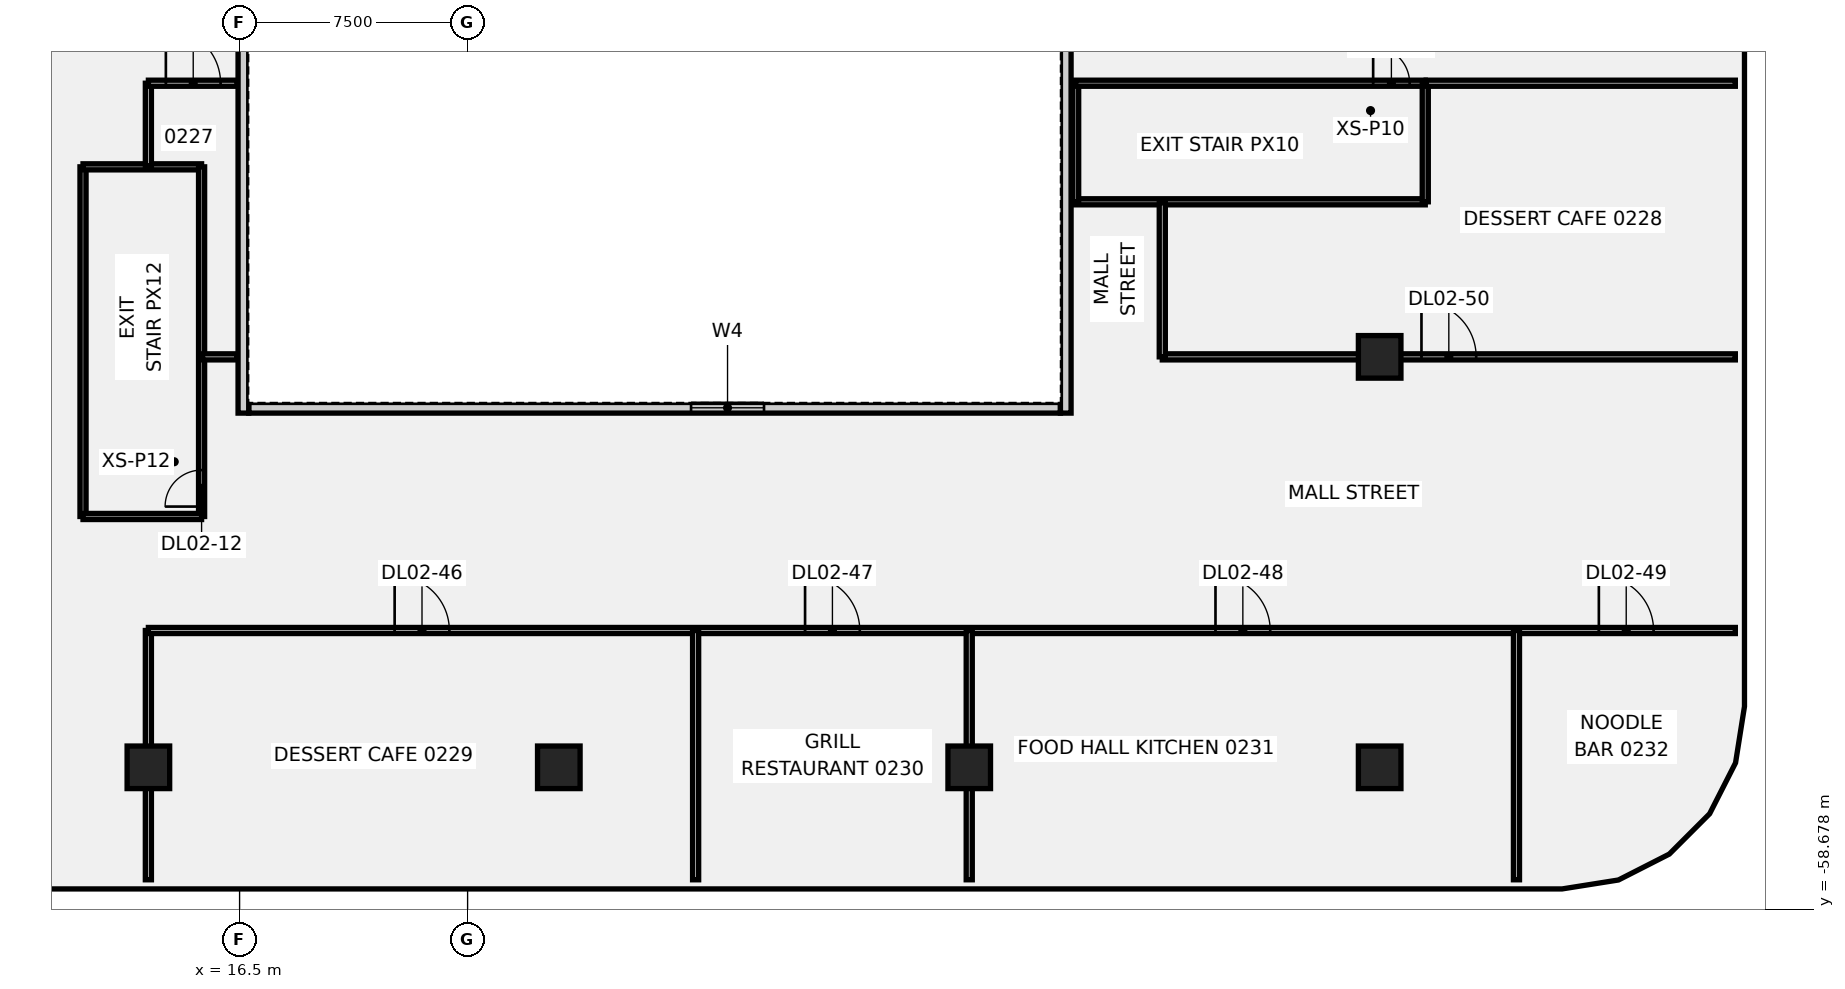
"""IFC4 building model, lengths in metres.
Left out: names, types, materials, properties, quantities, classifications, styles, units other than length and angle.
Written with IfcOpenShell. Run it as: python <this file> out.ifc"""

import sys

from ifc_helpers import new_model, si_unit, direction, frame, frame_2d, origin, origin_2d, place, context, subcontext, project, spatial, rectangle, extrude, element, fill, save


model = new_model("IFC4")
c1 = context("Model", 3, precision=1e-05, world=origin(), true_north=direction((0.0, 1.0)))
c2 = subcontext(c1, "Body", "Model", "MODEL_VIEW")
j1 = project(units=[si_unit("LENGTHUNIT", "METRE"), si_unit("PLANEANGLEUNIT", "RADIAN")], contexts=[c1])
p1 = place(None, origin())
s1 = spatial("IfcSite", under=j1, at=p1, CompositionType="ELEMENT")
p2 = place(p1, origin())
s2 = spatial("IfcBuilding", under=s1, at=p2, CompositionType="ELEMENT")
p3 = place(p2, frame((0.0, 0.0, 15.0)))
s3 = spatial("IfcBuildingStorey", under=s2, at=p3, CompositionType="ELEMENT", Elevation=15.0)
for number, where, z_axis, x_axis in (
    (1, (13.5, -54.0, -0.5), (0.0, 0.0, 1.0), (1.0, 0.0, 0.0)),
    (2, (27.0, -54.0, -0.5), (0.0, 0.0, 1.0), (1.0, 0.0, 0.0)),
    (3, (40.5, -54.0, -0.5), (0.0, 0.0, 1.0), (1.0, 0.0, 0.0)),
    (4, (54.0, -54.0, -0.5), (0.0, 0.0, 1.0), (1.0, 0.0, 0.0)),
    (5, (54.0, -40.5, -0.5), (0.0, 0.0, 1.0), (1.0, 0.0, 0.0)),
):
    element("IfcColumn", number, at=place(p3, frame(where, z_axis=z_axis, x_axis=x_axis)), inside=s3, PredefinedType="COLUMN", context=c2, shape_type="SweptSolid", body=[
        extrude(rectangle(XDim=1.4, YDim=1.4, at=origin_2d()), origin(), (0.0, 0.0, 1.0), 5.0),
    ])
p4 = place(p3, frame((11.35, -45.75, 0.0), z_axis=(0.0, 0.0, 1.0), x_axis=(0.0, 1.0, 0.0)))
e6 = element("IfcWall", 6, at=p4, inside=s3, PredefinedType="PARTITIONING", context=c2, shape_type="SweptSolid", body=[
    extrude(rectangle(XDim=11.5, YDim=0.2, at=frame_2d((5.75, 0.0))), origin(), (0.0, 0.0, 1.0), 4.5),
])
p5 = place(p3, frame((11.35, -34.25, 0.0), z_axis=(0.0, 0.0, 1.0), x_axis=(1.0, 0.0, 0.0)))
e7 = element("IfcWall", 7, at=p5, inside=s3, PredefinedType="PARTITIONING", context=c2, shape_type="SweptSolid", body=[
    extrude(rectangle(XDim=3.9, YDim=0.2, at=frame_2d((1.95, 0.0))), origin(), (0.0, 0.0, 1.0), 4.5),
])
p6 = place(p3, frame((15.25, -45.75, 0.0), z_axis=(0.0, 0.0, 1.0), x_axis=(0.0, 1.0, 0.0)))
e8 = element("IfcWall", 8, at=p6, inside=s3, PredefinedType="PARTITIONING", context=c2, shape_type="SweptSolid", body=[
    extrude(rectangle(XDim=11.5, YDim=0.2, at=frame_2d((5.75, 0.0))), origin(), (0.0, 0.0, 1.0), 4.5),
])
p7 = place(p6, frame((0.326, 0.0, 0.0)))
e9 = element("IfcOpeningElement", 9, at=p7, cuts=e8, PredefinedType="OPENING", context=c2, shape_type="SweptSolid", body=[
    extrude(rectangle(XDim=1.2, YDim=2.1, at=frame_2d((0.6, 1.05))), frame((0.0, 0.11, 0.0), z_axis=(0.0, -1.0, 0.0), x_axis=(1.0, 0.0, 0.0)), (0.0, 0.0, 1.0), 0.22),
])
p8 = place(p3, frame((11.35, -45.75, 0.0), z_axis=(0.0, 0.0, 1.0), x_axis=(1.0, 0.0, 0.0)))
e10 = element("IfcWall", 10, at=p8, inside=s3, PredefinedType="PARTITIONING", context=c2, shape_type="SweptSolid", body=[
    extrude(rectangle(XDim=3.9, YDim=0.2, at=frame_2d((1.95, 0.0))), origin(), (0.0, 0.0, 1.0), 4.5),
])
p9 = place(p3, frame((44.0, -35.4, 0.0), z_axis=(0.0, 0.0, 1.0), x_axis=(1.0, 0.0, 0.0)))
e11 = element("IfcWall", 11, at=p9, inside=s3, PredefinedType="PARTITIONING", context=c2, shape_type="SweptSolid", body=[
    extrude(rectangle(XDim=11.5, YDim=0.2, at=frame_2d((5.75, 0.0))), origin(), (0.0, 0.0, 1.0), 4.5),
])
p10 = place(p3, frame((44.0, -35.4, 0.0), z_axis=(0.0, 0.0, 1.0), x_axis=(0.0, 1.0, 0.0)))
e12 = element("IfcWall", 12, at=p10, inside=s3, PredefinedType="PARTITIONING", context=c2, shape_type="SweptSolid", body=[
    extrude(rectangle(XDim=3.9, YDim=0.2, at=frame_2d((1.95, 0.0))), origin(), (0.0, 0.0, 1.0), 4.5),
])
p11 = place(p3, frame((44.0, -31.5, 0.0), z_axis=(0.0, 0.0, 1.0), x_axis=(1.0, 0.0, 0.0)))
e13 = element("IfcWall", 13, at=p11, inside=s3, PredefinedType="PARTITIONING", context=c2, shape_type="SweptSolid", body=[
    extrude(rectangle(XDim=11.5, YDim=0.2, at=frame_2d((5.75, 0.0))), origin(), (0.0, 0.0, 1.0), 4.5),
])
p12 = place(p11, frame((9.786, 0.0, 0.0)))
e14 = element("IfcOpeningElement", 14, at=p12, cuts=e13, PredefinedType="OPENING", context=c2, shape_type="SweptSolid", body=[
    extrude(rectangle(XDim=1.2, YDim=2.1, at=frame_2d((0.6, 1.05))), frame((0.0, 0.11, 0.0), z_axis=(0.0, -1.0, 0.0), x_axis=(1.0, 0.0, 0.0)), (0.0, 0.0, 1.0), 0.22),
])
p13 = place(p3, frame((55.5, -35.4, 0.0), z_axis=(0.0, 0.0, 1.0), x_axis=(0.0, 1.0, 0.0)))
e15 = element("IfcWall", 15, at=p13, inside=s3, PredefinedType="PARTITIONING", context=c2, shape_type="SweptSolid", body=[
    extrude(rectangle(XDim=3.9, YDim=0.2, at=frame_2d((1.95, 0.0))), origin(), (0.0, 0.0, 1.0), 4.5),
])
p14 = place(p3, frame((13.5, -57.699, 0.0), z_axis=(0.0, 0.0, 1.0), x_axis=(0.0, 1.0, 0.0)))
e16 = element("IfcWall", 16, at=p14, inside=s3, PredefinedType="PARTITIONING", context=c2, shape_type="SweptSolid", body=[
    extrude(rectangle(XDim=8.199, YDim=0.2, at=frame_2d((4.1, 0.0))), origin(), (0.0, 0.0, 1.0), 4.5),
])
p15 = place(p3, frame((13.5, -49.5, 0.0), z_axis=(0.0, 0.0, 1.0), x_axis=(1.0, 0.0, 0.0)))
e17 = element("IfcWall", 17, at=p15, inside=s3, PredefinedType="PARTITIONING", context=c2, shape_type="SweptSolid", body=[
    extrude(rectangle(XDim=52.199, YDim=0.2, at=frame_2d((26.1, 0.0))), origin(), (0.0, 0.0, 1.0), 4.5),
])
p16 = place(p15, frame((8.1, 0.0, 0.0)))
e18 = element("IfcOpeningElement", 18, at=p16, cuts=e17, PredefinedType="OPENING", context=c2, shape_type="SweptSolid", body=[
    extrude(rectangle(XDim=1.8, YDim=2.1, at=frame_2d((0.9, 1.05))), frame((0.0, 0.11, 0.0), z_axis=(0.0, -1.0, 0.0), x_axis=(1.0, 0.0, 0.0)), (0.0, 0.0, 1.0), 0.22),
])
p17 = place(p15, frame((21.6, 0.0, 0.0)))
e19 = element("IfcOpeningElement", 19, at=p17, cuts=e17, PredefinedType="OPENING", context=c2, shape_type="SweptSolid", body=[
    extrude(rectangle(XDim=1.8, YDim=2.1, at=frame_2d((0.9, 1.05))), frame((0.0, 0.11, 0.0), z_axis=(0.0, -1.0, 0.0), x_axis=(1.0, 0.0, 0.0)), (0.0, 0.0, 1.0), 0.22),
])
p18 = place(p15, frame((35.1, 0.0, 0.0)))
e20 = element("IfcOpeningElement", 20, at=p18, cuts=e17, PredefinedType="OPENING", context=c2, shape_type="SweptSolid", body=[
    extrude(rectangle(XDim=1.8, YDim=2.1, at=frame_2d((0.9, 1.05))), frame((0.0, 0.11, 0.0), z_axis=(0.0, -1.0, 0.0), x_axis=(1.0, 0.0, 0.0)), (0.0, 0.0, 1.0), 0.22),
])
p19 = place(p15, frame((47.71, 0.0, 0.0)))
e21 = element("IfcOpeningElement", 21, at=p19, cuts=e17, PredefinedType="OPENING", context=c2, shape_type="SweptSolid", body=[
    extrude(rectangle(XDim=1.8, YDim=2.1, at=frame_2d((0.9, 1.05))), frame((0.0, 0.11, 0.0), z_axis=(0.0, -1.0, 0.0), x_axis=(1.0, 0.0, 0.0)), (0.0, 0.0, 1.0), 0.22),
])
p20 = place(p3, frame((13.5, -34.22, 0.0), z_axis=(0.0, 0.0, 1.0), x_axis=(0.0, 1.0, 0.0)))
e22 = element("IfcWall", 22, at=p20, inside=s3, PredefinedType="PARTITIONING", context=c2, shape_type="SweptSolid", body=[
    extrude(rectangle(XDim=2.72, YDim=0.2, at=frame_2d((1.36, 0.0))), origin(), (0.0, 0.0, 1.0), 4.5),
])
p21 = place(p3, frame((13.5, -31.5, 0.0), z_axis=(0.0, 0.0, 1.0), x_axis=(1.0, 0.0, 0.0)))
e23 = element("IfcWall", 23, at=p21, inside=s3, PredefinedType="PARTITIONING", context=c2, shape_type="SweptSolid", body=[
    extrude(rectangle(XDim=2.92, YDim=0.2, at=frame_2d((1.46, 0.0))), origin(), (0.0, 0.0, 1.0), 4.5),
])
p22 = place(p21, frame((0.575, 0.0, 0.0)))
e24 = element("IfcOpeningElement", 24, at=p22, cuts=e23, PredefinedType="OPENING", context=c2, shape_type="SweptSolid", body=[
    extrude(rectangle(XDim=1.8, YDim=2.1, at=frame_2d((0.9, 1.05))), frame((0.0, 0.11, 0.0), z_axis=(0.0, -1.0, 0.0), x_axis=(1.0, 0.0, 0.0)), (0.0, 0.0, 1.0), 0.22),
])
p23 = place(p3, frame((15.28, -40.5, 0.0), z_axis=(0.0, 0.0, 1.0), x_axis=(1.0, 0.0, 0.0)))
e25 = element("IfcWall", 25, at=p23, inside=s3, PredefinedType="PARTITIONING", context=c2, shape_type="SweptSolid", body=[
    extrude(rectangle(XDim=1.14, YDim=0.2, at=frame_2d((0.57, 0.0))), origin(), (0.0, 0.0, 1.0), 4.5),
])
for number, where, z_axis, x_axis in (
    (26, (31.5, -57.699, 0.0), (0.0, 0.0, 1.0), (0.0, 1.0, 0.0)),
    (27, (40.5, -57.699, 0.0), (0.0, 0.0, 1.0), (0.0, 1.0, 0.0)),
):
    element("IfcWall", number, at=place(p3, frame(where, z_axis=z_axis, x_axis=x_axis)), inside=s3, PredefinedType="PARTITIONING", context=c2, shape_type="SweptSolid", body=[
        extrude(rectangle(XDim=8.199, YDim=0.2, at=frame_2d((4.1, 0.0))), origin(), (0.0, 0.0, 1.0), 4.5),
    ])
p24 = place(p3, frame((46.85, -40.5, 0.0), z_axis=(0.0, 0.0, 1.0), x_axis=(1.0, 0.0, 0.0)))
e28 = element("IfcWall", 28, at=p24, inside=s3, PredefinedType="PARTITIONING", context=c2, shape_type="SweptSolid", body=[
    extrude(rectangle(XDim=18.849, YDim=0.2, at=frame_2d((9.424, 0.0))), origin(), (0.0, 0.0, 1.0), 4.5),
])
p25 = place(p24, frame((8.525, 0.0, 0.0)))
e29 = element("IfcOpeningElement", 29, at=p25, cuts=e28, PredefinedType="OPENING", context=c2, shape_type="SweptSolid", body=[
    extrude(rectangle(XDim=1.8, YDim=2.1, at=frame_2d((0.9, 1.05))), frame((0.0, 0.11, 0.0), z_axis=(0.0, -1.0, 0.0), x_axis=(1.0, 0.0, 0.0)), (0.0, 0.0, 1.0), 0.22),
])
p26 = place(p3, frame((46.85, -40.5, 0.0), z_axis=(0.0, 0.0, 1.0), x_axis=(0.0, 1.0, 0.0)))
e30 = element("IfcWall", 30, at=p26, inside=s3, PredefinedType="PARTITIONING", context=c2, shape_type="SweptSolid", body=[
    extrude(rectangle(XDim=5.07, YDim=0.2, at=frame_2d((2.535, 0.0))), origin(), (0.0, 0.0, 1.0), 4.5),
])
p27 = place(p3, frame((55.53, -31.5, 0.0), z_axis=(0.0, 0.0, 1.0), x_axis=(1.0, 0.0, 0.0)))
e31 = element("IfcWall", 31, at=p27, inside=s3, PredefinedType="PARTITIONING", context=c2, shape_type="SweptSolid", body=[
    extrude(rectangle(XDim=10.169, YDim=0.2, at=frame_2d((5.084, 0.0))), origin(), (0.0, 0.0, 1.0), 4.5),
])
p28 = place(p3, frame((58.5, -57.699, 0.0), z_axis=(0.0, 0.0, 1.0), x_axis=(0.0, 1.0, 0.0)))
e32 = element("IfcWall", 32, at=p28, inside=s3, PredefinedType="PARTITIONING", context=c2, shape_type="SweptSolid", body=[
    extrude(rectangle(XDim=8.199, YDim=0.2, at=frame_2d((4.1, 0.0))), origin(), (0.0, 0.0, 1.0), 4.5),
])
p29 = place(p3, frame((16.8, -42.175, 0.0), z_axis=(0.0, 0.0, 1.0), x_axis=(1.0, 0.0, 0.0)))
e33 = element("IfcWall", 33, at=p29, inside=s3, PredefinedType="SOLIDWALL", context=c2, shape_type="SweptSolid", body=[
    extrude(rectangle(XDim=26.7, YDim=0.35, at=frame_2d((13.35, 0.0))), origin(), (0.0, 0.0, 1.0), 4.5),
])
p30 = place(p29, frame((14.55, 0.0, 1.0)))
e34 = element("IfcOpeningElement", 34, at=p30, cuts=e33, PredefinedType="OPENING", context=c2, shape_type="SweptSolid", body=[
    extrude(rectangle(XDim=2.4, YDim=1.8, at=frame_2d((1.2, 0.9))), frame((0.0, 0.185, 0.0), z_axis=(0.0, -1.0, 0.0), x_axis=(1.0, 0.0, 0.0)), (0.0, 0.0, 1.0), 0.37),
])
p31 = place(p3, frame((16.625, -42.35, 0.0), z_axis=(0.0, 0.0, 1.0), x_axis=(0.0, 1.0, 0.0)))
e35 = element("IfcWall", 35, at=p31, inside=s3, PredefinedType="SOLIDWALL", context=c2, shape_type="SweptSolid", body=[
    extrude(rectangle(XDim=18.7, YDim=0.35, at=frame_2d((9.35, 0.0))), origin(), (0.0, 0.0, 1.0), 4.5),
])
p32 = place(p31, frame((14.9, 0.0, 1.0)))
e36 = element("IfcOpeningElement", 36, at=p32, cuts=e35, PredefinedType="OPENING", context=c2, shape_type="SweptSolid", body=[
    extrude(rectangle(XDim=2.4, YDim=1.8, at=frame_2d((1.2, 0.9))), frame((0.0, 0.185, 0.0), z_axis=(0.0, -1.0, 0.0), x_axis=(1.0, 0.0, 0.0)), (0.0, 0.0, 1.0), 0.37),
])
p33 = place(p3, frame((43.675, -42.35, 0.0), z_axis=(0.0, 0.0, 1.0), x_axis=(0.0, 1.0, 0.0)))
e37 = element("IfcWall", 37, at=p33, inside=s3, PredefinedType="SOLIDWALL", context=c2, shape_type="SweptSolid", body=[
    extrude(rectangle(XDim=18.7, YDim=0.35, at=frame_2d((9.35, 0.0))), origin(), (0.0, 0.0, 1.0), 4.5),
])
p34 = place(p33, frame((14.9, 0.0, 1.0)))
e38 = element("IfcOpeningElement", 38, at=p34, cuts=e37, PredefinedType="OPENING", context=c2, shape_type="SweptSolid", body=[
    extrude(rectangle(XDim=2.4, YDim=1.8, at=frame_2d((1.2, 0.9))), frame((0.0, 0.185, 0.0), z_axis=(0.0, -1.0, 0.0), x_axis=(1.0, 0.0, 0.0)), (0.0, 0.0, 1.0), 0.37),
])
p35 = place(p12, origin())
e39 = element("IfcDoor", 39, at=p35, inside=s3, OperationType="SINGLE_SWING_RIGHT", PredefinedType="DOOR", context=c2, shape_type="SweptSolid", body=[
    extrude(rectangle(XDim=1.2, YDim=2.1, at=frame_2d((0.6, 1.05))), frame((0.0, 0.025, 0.0), z_axis=(0.0, -1.0, 0.0), x_axis=(1.0, 0.0, 0.0)), (0.0, 0.0, 1.0), 0.05),
])
fill(e14, e39)
p36 = place(p7, origin())
e40 = element("IfcDoor", 40, at=p36, inside=s3, OperationType="SINGLE_SWING_RIGHT", PredefinedType="DOOR", context=c2, shape_type="SweptSolid", body=[
    extrude(rectangle(XDim=1.2, YDim=2.1, at=frame_2d((0.6, 1.05))), frame((0.0, 0.025, 0.0), z_axis=(0.0, -1.0, 0.0), x_axis=(1.0, 0.0, 0.0)), (0.0, 0.0, 1.0), 0.05),
])
fill(e9, e40)
p37 = place(p22, origin())
e41 = element("IfcDoor", 41, at=p37, inside=s3, OperationType="SINGLE_SWING_LEFT", PredefinedType="DOOR", context=c2, shape_type="SweptSolid", body=[
    extrude(rectangle(XDim=1.8, YDim=2.1, at=frame_2d((0.9, 1.05))), frame((0.0, 0.025, 0.0), z_axis=(0.0, -1.0, 0.0), x_axis=(1.0, 0.0, 0.0)), (0.0, 0.0, 1.0), 0.05),
])
fill(e24, e41)
p38 = place(p16, origin())
e42 = element("IfcDoor", 42, at=p38, inside=s3, OperationType="SINGLE_SWING_RIGHT", PredefinedType="DOOR", context=c2, shape_type="SweptSolid", body=[
    extrude(rectangle(XDim=1.8, YDim=2.1, at=frame_2d((0.9, 1.05))), frame((0.0, 0.025, 0.0), z_axis=(0.0, -1.0, 0.0), x_axis=(1.0, 0.0, 0.0)), (0.0, 0.0, 1.0), 0.05),
])
fill(e18, e42)
p39 = place(p17, origin())
e43 = element("IfcDoor", 43, at=p39, inside=s3, OperationType="SINGLE_SWING_LEFT", PredefinedType="DOOR", context=c2, shape_type="SweptSolid", body=[
    extrude(rectangle(XDim=1.8, YDim=2.1, at=frame_2d((0.9, 1.05))), frame((0.0, 0.025, 0.0), z_axis=(0.0, -1.0, 0.0), x_axis=(1.0, 0.0, 0.0)), (0.0, 0.0, 1.0), 0.05),
])
fill(e19, e43)
p40 = place(p18, origin())
e44 = element("IfcDoor", 44, at=p40, inside=s3, OperationType="SINGLE_SWING_RIGHT", PredefinedType="DOOR", context=c2, shape_type="SweptSolid", body=[
    extrude(rectangle(XDim=1.8, YDim=2.1, at=frame_2d((0.9, 1.05))), frame((0.0, 0.025, 0.0), z_axis=(0.0, -1.0, 0.0), x_axis=(1.0, 0.0, 0.0)), (0.0, 0.0, 1.0), 0.05),
])
fill(e20, e44)
p41 = place(p19, origin())
e45 = element("IfcDoor", 45, at=p41, inside=s3, OperationType="SINGLE_SWING_LEFT", PredefinedType="DOOR", context=c2, shape_type="SweptSolid", body=[
    extrude(rectangle(XDim=1.8, YDim=2.1, at=frame_2d((0.9, 1.05))), frame((0.0, 0.025, 0.0), z_axis=(0.0, -1.0, 0.0), x_axis=(1.0, 0.0, 0.0)), (0.0, 0.0, 1.0), 0.05),
])
fill(e21, e45)
p42 = place(p25, origin())
e46 = element("IfcDoor", 46, at=p42, inside=s3, OperationType="SINGLE_SWING_RIGHT", PredefinedType="DOOR", context=c2, shape_type="SweptSolid", body=[
    extrude(rectangle(XDim=1.8, YDim=2.1, at=frame_2d((0.9, 1.05))), frame((0.0, 0.025, 0.0), z_axis=(0.0, -1.0, 0.0), x_axis=(1.0, 0.0, 0.0)), (0.0, 0.0, 1.0), 0.05),
])
fill(e29, e46)
p43 = place(p30, origin())
e47 = element("IfcWindow", 47, at=p43, inside=s3, PartitioningType="SINGLE_PANEL", PredefinedType="WINDOW", context=c2, shape_type="SweptSolid", body=[
    extrude(rectangle(XDim=2.4, YDim=1.8, at=frame_2d((1.2, 0.9))), frame((0.0, 0.03, 0.0), z_axis=(0.0, -1.0, 0.0), x_axis=(1.0, 0.0, 0.0)), (0.0, 0.0, 1.0), 0.06),
])
fill(e34, e47)
save(model, sys.argv[1])
